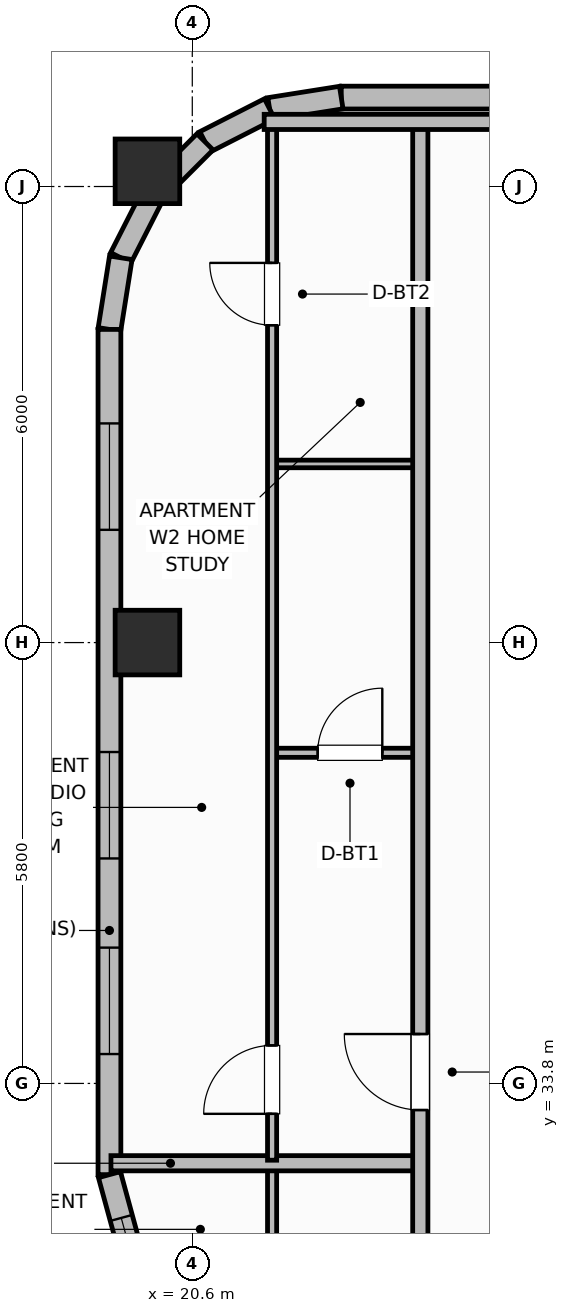
"""IFC4 building model, lengths in metres.
Left out: names, types, materials, properties, quantities, classifications, styles, units other than length and angle.
Written with IfcOpenShell. Run it as: python <this file> out.ifc"""

import sys

from ifc_helpers import new_model, si_unit, direction, frame, frame_2d, origin, origin_2d, place, context, subcontext, project, spatial, rectangle, extrude, element, fill, save


model = new_model("IFC4")
c1 = context("Model", 3, precision=1e-05, world=origin(), true_north=direction((0.0, 1.0)))
c2 = subcontext(c1, "Body", "Model", "MODEL_VIEW")
j1 = project(units=[si_unit("LENGTHUNIT", "METRE"), si_unit("PLANEANGLEUNIT", "RADIAN")], contexts=[c1])
p1 = place(None, origin())
s1 = spatial("IfcSite", under=j1, at=p1, CompositionType="ELEMENT")
p2 = place(p1, origin())
s2 = spatial("IfcBuilding", under=s1, at=p2, CompositionType="ELEMENT")
p3 = place(p2, frame((0.0, 0.0, 251.7)))
s3 = spatial("IfcBuildingStorey", under=s2, at=p3, CompositionType="ELEMENT", Elevation=251.7)
for number, where, z_axis, x_axis in (
    (1, (20.01, 39.6, 0.0), (0.0, 0.0, 1.0), (1.0, 0.0, 0.0)),
    (2, (20.01, 45.8, 0.0), (0.0, 0.0, 1.0), (1.0, 0.0, 0.0)),
):
    element("IfcColumn", number, at=place(p3, frame(where, z_axis=z_axis, x_axis=x_axis)), inside=s3, PredefinedType="COLUMN", context=c2, shape_type="SweptSolid", body=[
        extrude(rectangle(XDim=0.85, YDim=0.85, at=origin_2d()), origin(), (0.0, 0.0, 1.0), 3.7),
    ])
p4 = place(p3, frame((55.84, 46.77, 0.0), z_axis=(0.0, 0.0, 1.0), x_axis=(-1.0, 0.0, 0.0)))
e3 = element("IfcWall", 3, at=p4, inside=s3, PredefinedType="SOLIDWALL", context=c2, shape_type="SweptSolid", body=[
    extrude(rectangle(XDim=33.28, YDim=0.3, at=frame_2d((16.64, 0.0))), origin(), (0.0, 0.0, 1.0), 2.73),
])
p5 = place(p4, frame((4.647, 0.0, 0.71)))
e4 = element("IfcOpeningElement", 4, at=p5, cuts=e3, PredefinedType="OPENING", context=c2, shape_type="SweptSolid", body=[
    extrude(rectangle(XDim=1.6, YDim=1.9, at=frame_2d((0.8, 0.95))), frame((0.0, 0.16, 0.0), z_axis=(0.0, -1.0, 0.0), x_axis=(1.0, 0.0, 0.0)), (0.0, 0.0, 1.0), 0.32),
])
p6 = place(p4, frame((7.845, 0.0, 0.71)))
e5 = element("IfcOpeningElement", 5, at=p6, cuts=e3, PredefinedType="OPENING", context=c2, shape_type="SweptSolid", body=[
    extrude(rectangle(XDim=1.6, YDim=1.9, at=frame_2d((0.8, 0.95))), frame((0.0, 0.16, 0.0), z_axis=(0.0, -1.0, 0.0), x_axis=(1.0, 0.0, 0.0)), (0.0, 0.0, 1.0), 0.32),
])
p7 = place(p4, frame((14.241, 0.0, 0.71)))
e6 = element("IfcOpeningElement", 6, at=p7, cuts=e3, PredefinedType="OPENING", context=c2, shape_type="SweptSolid", body=[
    extrude(rectangle(XDim=1.6, YDim=1.9, at=frame_2d((0.8, 0.95))), frame((0.0, 0.16, 0.0), z_axis=(0.0, -1.0, 0.0), x_axis=(1.0, 0.0, 0.0)), (0.0, 0.0, 1.0), 0.32),
])
p8 = place(p4, frame((17.439, 0.0, 0.71)))
e7 = element("IfcOpeningElement", 7, at=p8, cuts=e3, PredefinedType="OPENING", context=c2, shape_type="SweptSolid", body=[
    extrude(rectangle(XDim=1.6, YDim=1.9, at=frame_2d((0.8, 0.95))), frame((0.0, 0.16, 0.0), z_axis=(0.0, -1.0, 0.0), x_axis=(1.0, 0.0, 0.0)), (0.0, 0.0, 1.0), 0.32),
])
p9 = place(p4, frame((23.835, 0.0, 0.71)))
e8 = element("IfcOpeningElement", 8, at=p9, cuts=e3, PredefinedType="OPENING", context=c2, shape_type="SweptSolid", body=[
    extrude(rectangle(XDim=1.6, YDim=1.9, at=frame_2d((0.8, 0.95))), frame((0.0, 0.16, 0.0), z_axis=(0.0, -1.0, 0.0), x_axis=(1.0, 0.0, 0.0)), (0.0, 0.0, 1.0), 0.32),
])
p10 = place(p4, frame((27.033, 0.0, 0.71)))
e9 = element("IfcOpeningElement", 9, at=p10, cuts=e3, PredefinedType="OPENING", context=c2, shape_type="SweptSolid", body=[
    extrude(rectangle(XDim=1.6, YDim=1.9, at=frame_2d((0.8, 0.95))), frame((0.0, 0.16, 0.0), z_axis=(0.0, -1.0, 0.0), x_axis=(1.0, 0.0, 0.0)), (0.0, 0.0, 1.0), 0.32),
])
p11 = place(p3, frame((22.56, 46.77, 0.0), z_axis=(0.0, 0.0, 1.0), x_axis=(-0.987669453596, -0.156553666304, 0.0)))
e10 = element("IfcWall", 10, at=p11, inside=s3, PredefinedType="SOLIDWALL", context=c2, shape_type="SweptSolid", body=[
    extrude(rectangle(XDim=0.954, YDim=0.3, at=frame_2d((0.477, 0.0))), origin(), (0.0, 0.0, 1.0), 2.73),
])
p12 = place(p3, frame((21.617, 46.621, 0.0), z_axis=(0.0, 0.0, 1.0), x_axis=(-0.891023873617, -0.45395644796, 0.0)))
e11 = element("IfcWall", 11, at=p12, inside=s3, PredefinedType="SOLIDWALL", context=c2, shape_type="SweptSolid", body=[
    extrude(rectangle(XDim=0.954, YDim=0.3, at=frame_2d((0.477, 0.0))), origin(), (0.0, 0.0, 1.0), 2.73),
])
p13 = place(p3, frame((20.767, 46.188, 0.0), z_axis=(0.0, 0.0, 1.0), x_axis=(-0.707106781187, -0.707106781187, 0.0)))
e12 = element("IfcWall", 12, at=p13, inside=s3, PredefinedType="SOLIDWALL", context=c2, shape_type="SweptSolid", body=[
    extrude(rectangle(XDim=0.954, YDim=0.3, at=frame_2d((0.477, 0.0))), origin(), (0.0, 0.0, 1.0), 2.73),
])
p14 = place(p3, frame((20.093, 45.513, 0.0), z_axis=(0.0, 0.0, 1.0), x_axis=(-0.454159573051, -0.890920356825, 0.0)))
e13 = element("IfcWall", 13, at=p14, inside=s3, PredefinedType="SOLIDWALL", context=c2, shape_type="SweptSolid", body=[
    extrude(rectangle(XDim=0.954, YDim=0.3, at=frame_2d((0.477, 0.0))), origin(), (0.0, 0.0, 1.0), 2.73),
])
p15 = place(p3, frame((19.659, 44.663, 0.0), z_axis=(0.0, 0.0, 1.0), x_axis=(-0.156304114255, -0.987708977314, 0.0)))
e14 = element("IfcWall", 14, at=p15, inside=s3, PredefinedType="SOLIDWALL", context=c2, shape_type="SweptSolid", body=[
    extrude(rectangle(XDim=0.954, YDim=0.3, at=frame_2d((0.477, 0.0))), origin(), (0.0, 0.0, 1.0), 2.73),
])
p16 = place(p3, frame((19.51, 43.72, 0.0), z_axis=(0.0, 0.0, 1.0), x_axis=(0.0, -1.0, 0.0)))
e15 = element("IfcWall", 15, at=p16, inside=s3, PredefinedType="SOLIDWALL", context=c2, shape_type="SweptSolid", body=[
    extrude(rectangle(XDim=11.12, YDim=0.3, at=frame_2d((5.56, 0.0))), origin(), (0.0, 0.0, 1.0), 2.73),
])
p17 = place(p16, frame((1.237, 0.0, 0.76)))
e16 = element("IfcOpeningElement", 16, at=p17, cuts=e15, PredefinedType="OPENING", context=c2, shape_type="SweptSolid", body=[
    extrude(rectangle(XDim=1.4, YDim=1.85, at=frame_2d((0.7, 0.925))), frame((0.0, 0.16, 0.0), z_axis=(0.0, -1.0, 0.0), x_axis=(1.0, 0.0, 0.0)), (0.0, 0.0, 1.0), 0.32),
])
p18 = place(p16, frame((5.56, 0.0, 0.76)))
e17 = element("IfcOpeningElement", 17, at=p18, cuts=e15, PredefinedType="OPENING", context=c2, shape_type="SweptSolid", body=[
    extrude(rectangle(XDim=1.4, YDim=1.85, at=frame_2d((0.7, 0.925))), frame((0.0, 0.16, 0.0), z_axis=(0.0, -1.0, 0.0), x_axis=(1.0, 0.0, 0.0)), (0.0, 0.0, 1.0), 0.32),
])
p19 = place(p16, frame((8.133, 0.0, 0.76)))
e18 = element("IfcOpeningElement", 18, at=p19, cuts=e15, PredefinedType="OPENING", context=c2, shape_type="SweptSolid", body=[
    extrude(rectangle(XDim=1.4, YDim=1.85, at=frame_2d((0.7, 0.925))), frame((0.0, 0.16, 0.0), z_axis=(0.0, -1.0, 0.0), x_axis=(1.0, 0.0, 0.0)), (0.0, 0.0, 1.0), 0.32),
])
p20 = place(p3, frame((19.51, 32.6, 0.0), z_axis=(0.0, 0.0, 1.0), x_axis=(0.263135522356, -0.964758880174, 0.0)))
e19 = element("IfcWall", 19, at=p20, inside=s3, PredefinedType="SOLIDWALL", context=c2, shape_type="SweptSolid", body=[
    extrude(rectangle(XDim=2.281, YDim=0.3, at=frame_2d((1.14, 0.0))), origin(), (0.0, 0.0, 1.0), 2.73),
])
p21 = place(p20, frame((0.59, 0.0, 0.92)))
e20 = element("IfcOpeningElement", 20, at=p21, cuts=e19, PredefinedType="OPENING", context=c2, shape_type="SweptSolid", body=[
    extrude(rectangle(XDim=1.1, YDim=1.65, at=frame_2d((0.55, 0.825))), frame((0.0, 0.16, 0.0), z_axis=(0.0, -1.0, 0.0), x_axis=(1.0, 0.0, 0.0)), (0.0, 0.0, 1.0), 0.32),
])
p22 = place(p3, frame((21.65, 9.99, 0.0), z_axis=(0.0, 0.0, 1.0), x_axis=(0.0, 1.0, 0.0)))
e21 = element("IfcWall", 21, at=p22, inside=s3, PredefinedType="PARTITIONING", context=c2, shape_type="SweptSolid", body=[
    extrude(rectangle(XDim=22.72, YDim=0.12, at=frame_2d((11.36, 0.0))), origin(), (0.0, 0.0, 1.0), 2.56),
])
p23 = place(p22, frame((0.41, 0.0, 0.0)))
e22 = element("IfcOpeningElement", 22, at=p23, cuts=e21, PredefinedType="OPENING", context=c2, shape_type="SweptSolid", body=[
    extrude(rectangle(XDim=0.9, YDim=2.1, at=frame_2d((0.45, 1.05))), frame((0.0, 0.07, 0.0), z_axis=(0.0, -1.0, 0.0), x_axis=(1.0, 0.0, 0.0)), (0.0, 0.0, 1.0), 0.14),
])
p24 = place(p22, frame((15.535, 0.0, 0.0)))
e23 = element("IfcOpeningElement", 23, at=p24, cuts=e21, PredefinedType="OPENING", context=c2, shape_type="SweptSolid", body=[
    extrude(rectangle(XDim=0.82, YDim=2.08, at=frame_2d((0.41, 1.04))), frame((0.0, 0.07, 0.0), z_axis=(0.0, -1.0, 0.0), x_axis=(1.0, 0.0, 0.0)), (0.0, 0.0, 1.0), 0.14),
])
p25 = place(p3, frame((19.53, 32.75, 0.0), z_axis=(0.0, 0.0, 1.0), x_axis=(1.0, 0.0, 0.0)))
e24 = element("IfcWall", 24, at=p25, inside=s3, PredefinedType="PARTITIONING", context=c2, shape_type="SweptSolid", body=[
    extrude(rectangle(XDim=4.07, YDim=0.2, at=frame_2d((2.035, 0.0))), origin(), (0.0, 0.0, 1.0), 2.56),
])
p26 = place(p3, frame((21.65, 38.15, 0.0), z_axis=(0.0, 0.0, 1.0), x_axis=(1.0, 0.0, 0.0)))
e25 = element("IfcWall", 25, at=p26, inside=s3, PredefinedType="PARTITIONING", context=c2, shape_type="SweptSolid", body=[
    extrude(rectangle(XDim=1.95, YDim=0.12, at=frame_2d((0.975, 0.0))), origin(), (0.0, 0.0, 1.0), 2.56),
])
p27 = place(p26, frame((0.6, 0.0, 0.0)))
e26 = element("IfcOpeningElement", 26, at=p27, cuts=e25, PredefinedType="OPENING", context=c2, shape_type="SweptSolid", body=[
    extrude(rectangle(XDim=0.85, YDim=2.1, at=frame_2d((0.425, 1.05))), frame((0.0, 0.07, 0.0), z_axis=(0.0, -1.0, 0.0), x_axis=(1.0, 0.0, 0.0)), (0.0, 0.0, 1.0), 0.14),
])
p28 = place(p3, frame((21.65, 41.95, 0.0), z_axis=(0.0, 0.0, 1.0), x_axis=(1.0, 0.0, 0.0)))
e27 = element("IfcWall", 27, at=p28, inside=s3, PredefinedType="PARTITIONING", context=c2, shape_type="SweptSolid", body=[
    extrude(rectangle(XDim=1.95, YDim=0.1, at=frame_2d((0.975, 0.0))), origin(), (0.0, 0.0, 1.0), 2.56),
])
p29 = place(p3, frame((21.65, 32.79, 0.0), z_axis=(0.0, 0.0, 1.0), x_axis=(0.0, 1.0, 0.0)))
e28 = element("IfcWall", 28, at=p29, inside=s3, PredefinedType="PARTITIONING", context=c2, shape_type="SweptSolid", body=[
    extrude(rectangle(XDim=13.62, YDim=0.12, at=frame_2d((6.81, 0.0))), origin(), (0.0, 0.0, 1.0), 2.56),
])
p30 = place(p29, frame((0.61, 0.0, 0.0)))
e29 = element("IfcOpeningElement", 29, at=p30, cuts=e28, PredefinedType="OPENING", context=c2, shape_type="SweptSolid", body=[
    extrude(rectangle(XDim=0.9, YDim=2.1, at=frame_2d((0.45, 1.05))), frame((0.0, 0.07, 0.0), z_axis=(0.0, -1.0, 0.0), x_axis=(1.0, 0.0, 0.0)), (0.0, 0.0, 1.0), 0.14),
])
p31 = place(p29, frame((10.985, 0.0, 0.0)))
e30 = element("IfcOpeningElement", 30, at=p31, cuts=e28, PredefinedType="OPENING", context=c2, shape_type="SweptSolid", body=[
    extrude(rectangle(XDim=0.82, YDim=2.08, at=frame_2d((0.41, 1.04))), frame((0.0, 0.07, 0.0), z_axis=(0.0, -1.0, 0.0), x_axis=(1.0, 0.0, 0.0)), (0.0, 0.0, 1.0), 0.14),
])
p32 = place(p3, frame((23.6, 9.95, 0.0), z_axis=(0.0, 0.0, 1.0), x_axis=(0.0, 1.0, 0.0)))
e31 = element("IfcWall", 31, at=p32, inside=s3, PredefinedType="PARTITIONING", context=c2, shape_type="SweptSolid", body=[
    extrude(rectangle(XDim=36.5, YDim=0.2, at=frame_2d((18.25, 0.0))), origin(), (0.0, 0.0, 1.0), 2.56),
])
p33 = place(p32, frame((3.25, 0.0, 0.0)))
e32 = element("IfcOpeningElement", 32, at=p33, cuts=e31, PredefinedType="OPENING", context=c2, shape_type="SweptSolid", body=[
    extrude(rectangle(XDim=1.0, YDim=2.15, at=frame_2d((0.5, 1.075))), frame((0.0, 0.11, 0.0), z_axis=(0.0, -1.0, 0.0), x_axis=(1.0, 0.0, 0.0)), (0.0, 0.0, 1.0), 0.22),
])
p34 = place(p32, frame((23.5, 0.0, 0.0)))
e33 = element("IfcOpeningElement", 33, at=p34, cuts=e31, PredefinedType="OPENING", context=c2, shape_type="SweptSolid", body=[
    extrude(rectangle(XDim=1.0, YDim=2.15, at=frame_2d((0.5, 1.075))), frame((0.0, 0.11, 0.0), z_axis=(0.0, -1.0, 0.0), x_axis=(1.0, 0.0, 0.0)), (0.0, 0.0, 1.0), 0.22),
])
p35 = place(p3, frame((21.546, 46.45, 0.0), z_axis=(0.0, 0.0, 1.0), x_axis=(1.0, 0.0, 0.0)))
e34 = element("IfcWall", 34, at=p35, inside=s3, PredefinedType="PARTITIONING", context=c2, shape_type="SweptSolid", body=[
    extrude(rectangle(XDim=3.754, YDim=0.2, at=frame_2d((1.877, 0.0))), origin(), (0.0, 0.0, 1.0), 2.56),
])
p36 = place(p17, origin())
e35 = element("IfcWindow", 35, at=p36, inside=s3, PartitioningType="SINGLE_PANEL", PredefinedType="WINDOW", context=c2, shape_type="SweptSolid", body=[
    extrude(rectangle(XDim=1.4, YDim=1.85, at=frame_2d((0.7, 0.925))), frame((0.0, 0.03, 0.0), z_axis=(0.0, -1.0, 0.0), x_axis=(1.0, 0.0, 0.0)), (0.0, 0.0, 1.0), 0.06),
])
fill(e16, e35)
p37 = place(p18, origin())
e36 = element("IfcWindow", 36, at=p37, inside=s3, PartitioningType="SINGLE_PANEL", PredefinedType="WINDOW", context=c2, shape_type="SweptSolid", body=[
    extrude(rectangle(XDim=1.4, YDim=1.85, at=frame_2d((0.7, 0.925))), frame((0.0, 0.03, 0.0), z_axis=(0.0, -1.0, 0.0), x_axis=(1.0, 0.0, 0.0)), (0.0, 0.0, 1.0), 0.06),
])
fill(e17, e36)
p38 = place(p19, origin())
e37 = element("IfcWindow", 37, at=p38, inside=s3, PartitioningType="SINGLE_PANEL", PredefinedType="WINDOW", context=c2, shape_type="SweptSolid", body=[
    extrude(rectangle(XDim=1.4, YDim=1.85, at=frame_2d((0.7, 0.925))), frame((0.0, 0.03, 0.0), z_axis=(0.0, -1.0, 0.0), x_axis=(1.0, 0.0, 0.0)), (0.0, 0.0, 1.0), 0.06),
])
fill(e18, e37)
p39 = place(p21, origin())
e38 = element("IfcWindow", 38, at=p39, inside=s3, PartitioningType="SINGLE_PANEL", PredefinedType="WINDOW", context=c2, shape_type="SweptSolid", body=[
    extrude(rectangle(XDim=1.1, YDim=1.65, at=frame_2d((0.55, 0.825))), frame((0.0, 0.03, 0.0), z_axis=(0.0, -1.0, 0.0), x_axis=(1.0, 0.0, 0.0)), (0.0, 0.0, 1.0), 0.06),
])
fill(e20, e38)
p40 = place(p27, origin())
e39 = element("IfcDoor", 39, at=p40, inside=s3, OperationType="SINGLE_SWING_RIGHT", PredefinedType="DOOR", context=c2, shape_type="SweptSolid", body=[
    extrude(rectangle(XDim=0.85, YDim=2.1, at=frame_2d((0.425, 1.05))), frame((0.0, 0.025, 0.0), z_axis=(0.0, -1.0, 0.0), x_axis=(1.0, 0.0, 0.0)), (0.0, 0.0, 1.0), 0.05),
])
fill(e26, e39)
p41 = place(p30, origin())
e40 = element("IfcDoor", 40, at=p41, inside=s3, OperationType="SINGLE_SWING_LEFT", PredefinedType="DOOR", context=c2, shape_type="SweptSolid", body=[
    extrude(rectangle(XDim=0.9, YDim=2.1, at=frame_2d((0.45, 1.05))), frame((0.0, 0.025, 0.0), z_axis=(0.0, -1.0, 0.0), x_axis=(1.0, 0.0, 0.0)), (0.0, 0.0, 1.0), 0.05),
])
fill(e29, e40)
p42 = place(p31, origin())
e41 = element("IfcDoor", 41, at=p42, inside=s3, OperationType="SINGLE_SWING_RIGHT", PredefinedType="DOOR", context=c2, shape_type="SweptSolid", body=[
    extrude(rectangle(XDim=0.82, YDim=2.08, at=frame_2d((0.41, 1.04))), frame((0.0, 0.025, 0.0), z_axis=(0.0, -1.0, 0.0), x_axis=(1.0, 0.0, 0.0)), (0.0, 0.0, 1.0), 0.05),
])
fill(e30, e41)
p43 = place(p34, origin())
e42 = element("IfcDoor", 42, at=p43, inside=s3, OperationType="SINGLE_SWING_RIGHT", PredefinedType="DOOR", context=c2, shape_type="SweptSolid", body=[
    extrude(rectangle(XDim=1.0, YDim=2.15, at=frame_2d((0.5, 1.075))), frame((0.0, 0.025, 0.0), z_axis=(0.0, -1.0, 0.0), x_axis=(1.0, 0.0, 0.0)), (0.0, 0.0, 1.0), 0.05),
])
fill(e33, e42)
save(model, sys.argv[1])
